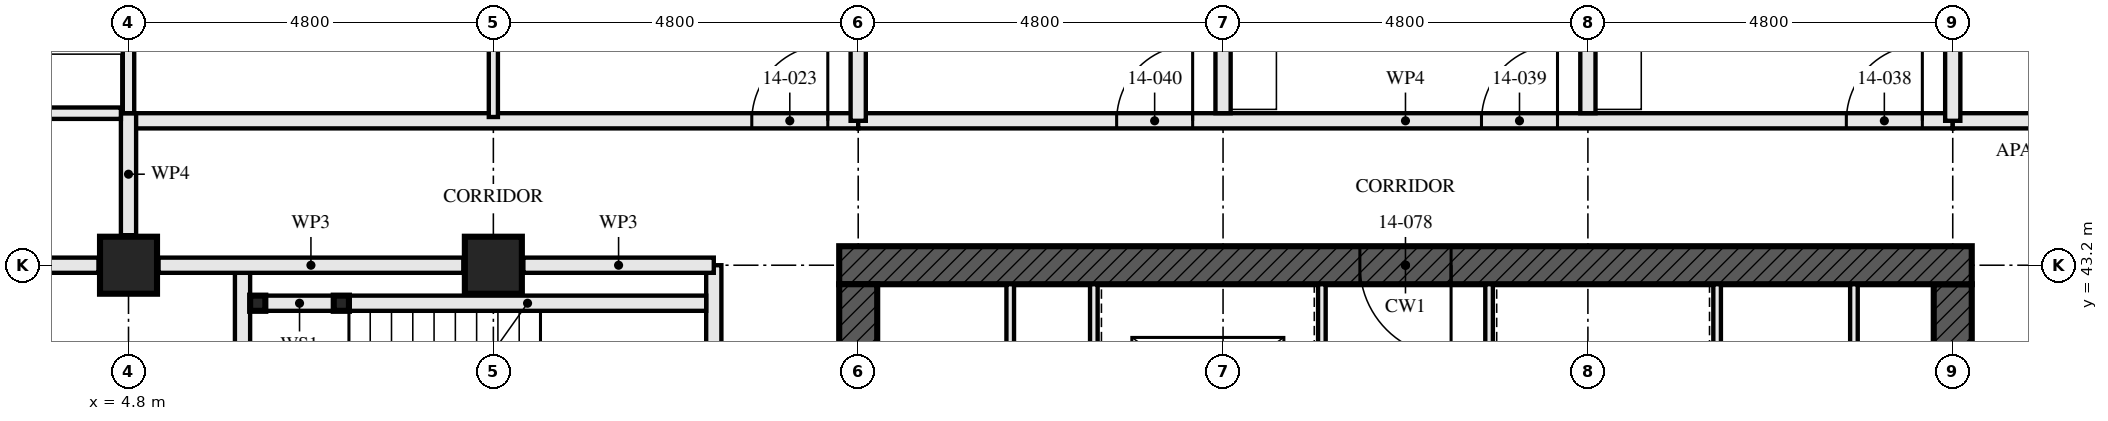
"""IFC4 building model, lengths in metres.
Left out: names, types, materials, properties, quantities, classifications, styles, units other than length and angle.
Written with IfcOpenShell. Run it as: python <this file> out.ifc"""

import sys

from ifc_helpers import new_model, si_unit, direction, frame, frame_2d, origin, origin_2d, place, context, subcontext, project, spatial, rectangle, hollow_rectangle, extrude, element, fill, save


model = new_model("IFC4")
c1 = context("Model", 3, precision=1e-05, world=origin(), true_north=direction((0.0, 1.0)))
c2 = subcontext(c1, "Body", "Model", "MODEL_VIEW")
j1 = project(units=[si_unit("LENGTHUNIT", "METRE"), si_unit("PLANEANGLEUNIT", "RADIAN")], contexts=[c1])
p1 = place(None, origin())
s1 = spatial("IfcSite", under=j1, at=p1, CompositionType="ELEMENT")
p2 = place(p1, origin())
s2 = spatial("IfcBuilding", under=s1, at=p2, CompositionType="ELEMENT")
p3 = place(p2, frame((0.0, 0.0, 55.0)))
s3 = spatial("IfcBuildingStorey", under=s2, at=p3, CompositionType="ELEMENT", Elevation=55.0)
for number, where, z_axis, x_axis in (
    (1, (4.8, 43.2, 0.0), (0.0, 0.0, 1.0), (0.0, 1.0, 0.0)),
    (2, (9.6, 43.2, 0.0), (0.0, 0.0, 1.0), (0.0, 1.0, 0.0)),
):
    element("IfcColumn", number, at=place(p3, frame(where, z_axis=z_axis, x_axis=x_axis)), inside=s3, PredefinedType="COLUMN", context=c2, shape_type="SweptSolid", body=[
        extrude(hollow_rectangle(XDim=0.75, YDim=0.75, WallThickness=0.08, at=origin_2d()), origin(), (0.0, 0.0, 1.0), 3.5),
    ])
p4 = place(p3, frame((29.05, 43.2, -0.17), z_axis=(0.0, 0.0, 1.0), x_axis=(-1.0, 0.0, 0.0)))
e3 = element("IfcWall", 3, at=p4, inside=s3, PredefinedType="SHEAR", context=c2, shape_type="SweptSolid", body=[
    extrude(rectangle(XDim=14.9, YDim=0.5, at=frame_2d((7.45, 0.0))), origin(), (0.0, 0.0, 1.0), 3.5),
])
p5 = place(p4, frame((6.85, 0.0, 0.17)))
e4 = element("IfcOpeningElement", 4, at=p5, cuts=e3, PredefinedType="OPENING", context=c2, shape_type="SweptSolid", body=[
    extrude(rectangle(XDim=1.2, YDim=2.1, at=frame_2d((0.6, 1.05))), frame((0.0, 0.26, 0.0), z_axis=(0.0, -1.0, 0.0), x_axis=(1.0, 0.0, 0.0)), (0.0, 0.0, 1.0), 0.521),
])
p6 = place(p3, frame((14.4, 42.95, -0.17), z_axis=(0.0, 0.0, 1.0), x_axis=(0.0, -1.0, 0.0)))
e5 = element("IfcWall", 5, at=p6, inside=s3, PredefinedType="SHEAR", context=c2, shape_type="SweptSolid", body=[
    extrude(rectangle(XDim=13.9, YDim=0.5, at=frame_2d((6.95, 0.0))), origin(), (0.0, 0.0, 1.0), 3.5),
])
p7 = place(p6, frame((6.35, 0.0, 0.17)))
e6 = element("IfcOpeningElement", 6, at=p7, cuts=e5, PredefinedType="OPENING", context=c2, shape_type="SweptSolid", body=[
    extrude(rectangle(XDim=1.2, YDim=2.1, at=frame_2d((0.6, 1.05))), frame((0.0, 0.26, 0.0), z_axis=(0.0, -1.0, 0.0), x_axis=(1.0, 0.0, 0.0)), (0.0, 0.0, 1.0), 0.521),
])
p8 = place(p3, frame((28.8, 29.05, -0.17), z_axis=(0.0, 0.0, 1.0), x_axis=(0.0, 1.0, 0.0)))
e7 = element("IfcWall", 7, at=p8, inside=s3, PredefinedType="SHEAR", context=c2, shape_type="SweptSolid", body=[
    extrude(rectangle(XDim=13.9, YDim=0.5, at=frame_2d((6.95, 0.0))), origin(), (0.0, 0.0, 1.0), 3.5),
])
p9 = place(p8, frame((6.35, 0.0, 0.17)))
e8 = element("IfcOpeningElement", 8, at=p9, cuts=e7, PredefinedType="OPENING", context=c2, shape_type="SweptSolid", body=[
    extrude(rectangle(XDim=1.2, YDim=2.1, at=frame_2d((0.6, 1.05))), frame((0.0, 0.26, 0.0), z_axis=(0.0, -1.0, 0.0), x_axis=(1.0, 0.0, 0.0)), (0.0, 0.0, 1.0), 0.521),
])
for number, where, z_axis, x_axis in (
    (9, (6.5, 42.7, 0.0), (0.0, 0.0, 1.0), (1.0, 0.0, 0.0)),
    (10, (7.6, 42.7, 0.0), (0.0, 0.0, 1.0), (1.0, 0.0, 0.0)),
):
    element("IfcColumn", number, at=place(p3, frame(where, z_axis=z_axis, x_axis=x_axis)), inside=s3, PredefinedType="COLUMN", context=c2, shape_type="SweptSolid", body=[
        extrude(hollow_rectangle(XDim=0.2, YDim=0.2, WallThickness=0.008, at=origin_2d()), origin(), (0.0, 0.0, 1.0), 3.33),
    ])
p10 = place(p3, frame((6.6, 42.7, 0.0), z_axis=(0.0, 0.0, 1.0), x_axis=(1.0, 0.0, 0.0)))
e11 = element("IfcWall", 11, at=p10, inside=s3, PredefinedType="SOLIDWALL", context=c2, shape_type="SweptSolid", body=[
    extrude(rectangle(XDim=0.9, YDim=0.2, at=frame_2d((0.45, 0.0))), origin(), (0.0, 0.0, 1.0), 2.99),
])
p11 = place(p3, frame((7.7, 42.7, 0.0), z_axis=(0.0, 0.0, 1.0), x_axis=(1.0, 0.0, 0.0)))
e12 = element("IfcWall", 12, at=p11, inside=s3, PredefinedType="SOLIDWALL", context=c2, shape_type="SweptSolid", body=[
    extrude(rectangle(XDim=4.7, YDim=0.2, at=frame_2d((2.35, 0.0))), origin(), (0.0, 0.0, 1.0), 2.99),
])
p12 = place(p3, frame((6.3, 43.1, 0.0), z_axis=(0.0, 0.0, 1.0), x_axis=(0.0, -1.0, 0.0)))
e13 = element("IfcWall", 13, at=p12, inside=s3, PredefinedType="SOLIDWALL", context=c2, shape_type="SweptSolid", body=[
    extrude(rectangle(XDim=3.3, YDim=0.2, at=frame_2d((1.65, 0.0))), origin(), (0.0, 0.0, 1.0), 3.33),
])
p13 = place(p3, frame((12.5, 43.2, 0.0), z_axis=(0.0, 0.0, 1.0), x_axis=(0.0, -1.0, 0.0)))
e14 = element("IfcWall", 14, at=p13, inside=s3, PredefinedType="PARTITIONING", context=c2, shape_type="SweptSolid", body=[
    extrude(rectangle(XDim=14.4, YDim=0.2, at=frame_2d((7.2, 0.0))), origin(), (0.0, 0.0, 1.0), 2.55),
])
p14 = place(p13, frame((1.4, 0.0, 0.0)))
e15 = element("IfcOpeningElement", 15, at=p14, cuts=e14, PredefinedType="OPENING", context=c2, shape_type="SweptSolid", body=[
    extrude(rectangle(XDim=1.0, YDim=2.1, at=frame_2d((0.5, 1.05))), frame((0.0, 0.111, 0.0), z_axis=(0.0, -1.0, 0.0), x_axis=(1.0, 0.0, 0.0)), (0.0, 0.0, 1.0), 0.221),
])
p15 = place(p13, frame((5.2, 0.0, 0.0)))
e16 = element("IfcOpeningElement", 16, at=p15, cuts=e14, PredefinedType="OPENING", context=c2, shape_type="SweptSolid", body=[
    extrude(rectangle(XDim=1.0, YDim=2.1, at=frame_2d((0.5, 1.05))), frame((0.0, 0.111, 0.0), z_axis=(0.0, -1.0, 0.0), x_axis=(1.0, 0.0, 0.0)), (0.0, 0.0, 1.0), 0.221),
])
p16 = place(p13, frame((10.0, 0.0, 0.0)))
e17 = element("IfcOpeningElement", 17, at=p16, cuts=e14, PredefinedType="OPENING", context=c2, shape_type="SweptSolid", body=[
    extrude(rectangle(XDim=1.0, YDim=2.1, at=frame_2d((0.5, 1.05))), frame((0.0, 0.111, 0.0), z_axis=(0.0, -1.0, 0.0), x_axis=(1.0, 0.0, 0.0)), (0.0, 0.0, 1.0), 0.221),
])
p17 = place(p3, frame((4.8, 48.2, 0.0), z_axis=(0.0, 0.0, 1.0), x_axis=(0.0, -1.0, 0.0)))
e18 = element("IfcWall", 18, at=p17, inside=s3, PredefinedType="PARTITIONING", context=c2, shape_type="SweptSolid", body=[
    extrude(rectangle(XDim=3.0, YDim=0.15, at=frame_2d((1.5, 0.0))), origin(), (0.0, 0.0, 1.0), 2.55),
])
p18 = place(p17, frame((1.05, 0.0, 0.0)))
e19 = element("IfcOpeningElement", 19, at=p18, cuts=e18, PredefinedType="OPENING", context=c2, shape_type="SweptSolid", body=[
    extrude(rectangle(XDim=0.9, YDim=2.1, at=frame_2d((0.45, 1.05))), frame((0.0, 0.085, 0.0), z_axis=(0.0, -1.0, 0.0), x_axis=(1.0, 0.0, 0.0)), (0.0, 0.0, 1.0), 0.171),
])
p19 = place(p3, frame((9.6, 53.4, 0.0), z_axis=(0.0, 0.0, 1.0), x_axis=(0.0, -1.0, 0.0)))
e20 = element("IfcWall", 20, at=p19, inside=s3, PredefinedType="PARTITIONING", context=c2, shape_type="SweptSolid", body=[
    extrude(rectangle(XDim=8.25, YDim=0.12, at=frame_2d((4.125, 0.0))), origin(), (0.0, 0.0, 1.0), 2.55),
])
p20 = place(p19, frame((5.15, 0.0, 0.0)))
e21 = element("IfcOpeningElement", 21, at=p20, cuts=e20, PredefinedType="OPENING", context=c2, shape_type="SweptSolid", body=[
    extrude(rectangle(XDim=0.9, YDim=2.1, at=frame_2d((0.45, 1.05))), frame((0.0, 0.071, 0.0), z_axis=(0.0, -1.0, 0.0), x_axis=(1.0, 0.0, 0.0)), (0.0, 0.0, 1.0), 0.141),
])
p21 = place(p3, frame((14.4, 45.1, 0.0), z_axis=(0.0, 0.0, 1.0), x_axis=(-1.0, 0.0, 0.0)))
e22 = element("IfcWall", 22, at=p21, inside=s3, PredefinedType="PARTITIONING", context=c2, shape_type="SweptSolid", body=[
    extrude(rectangle(XDim=9.6, YDim=0.2, at=frame_2d((4.8, 0.0))), origin(), (0.0, 0.0, 1.0), 3.33),
])
p22 = place(p21, frame((0.4, 0.0, 0.0)))
e23 = element("IfcOpeningElement", 23, at=p22, cuts=e22, PredefinedType="OPENING", context=c2, shape_type="SweptSolid", body=[
    extrude(rectangle(XDim=1.0, YDim=2.1, at=frame_2d((0.5, 1.05))), frame((0.0, 0.111, 0.0), z_axis=(0.0, -1.0, 0.0), x_axis=(1.0, 0.0, 0.0)), (0.0, 0.0, 1.0), 0.221),
])
p23 = place(p3, frame((4.8, 45.2, 0.0), z_axis=(0.0, 0.0, 1.0), x_axis=(0.0, -1.0, 0.0)))
e24 = element("IfcWall", 24, at=p23, inside=s3, PredefinedType="PARTITIONING", context=c2, shape_type="SweptSolid", body=[
    extrude(rectangle(XDim=1.605, YDim=0.2, at=frame_2d((0.802, 0.0))), origin(), (0.0, 0.0, 1.0), 3.33),
])
for number, where, z_axis, x_axis in (
    (25, (24.0, 57.28, 0.0), (0.0, 0.0, 1.0), (0.0, -1.0, 0.0)),
    (26, (19.2, 57.28, 0.0), (0.0, 0.0, 1.0), (0.0, -1.0, 0.0)),
):
    element("IfcWall", number, at=place(p3, frame(where, z_axis=z_axis, x_axis=x_axis)), inside=s3, PredefinedType="PARTITIONING", context=c2, shape_type="SweptSolid", body=[
        extrude(rectangle(XDim=12.08, YDim=0.2, at=frame_2d((6.04, 0.0))), origin(), (0.0, 0.0, 1.0), 2.55),
    ])
p24 = place(p3, frame((28.8, 45.1, 0.0), z_axis=(0.0, 0.0, 1.0), x_axis=(-1.0, 0.0, 0.0)))
e27 = element("IfcWall", 27, at=p24, inside=s3, PredefinedType="PARTITIONING", context=c2, shape_type="SweptSolid", body=[
    extrude(rectangle(XDim=14.4, YDim=0.2, at=frame_2d((7.2, 0.0))), origin(), (0.0, 0.0, 1.0), 3.33),
])
p25 = place(p24, frame((0.4, 0.0, 0.0)))
e28 = element("IfcOpeningElement", 28, at=p25, cuts=e27, PredefinedType="OPENING", context=c2, shape_type="SweptSolid", body=[
    extrude(rectangle(XDim=1.0, YDim=2.1, at=frame_2d((0.5, 1.05))), frame((0.0, 0.111, 0.0), z_axis=(0.0, -1.0, 0.0), x_axis=(1.0, 0.0, 0.0)), (0.0, 0.0, 1.0), 0.221),
])
p26 = place(p24, frame((5.2, 0.0, 0.0)))
e29 = element("IfcOpeningElement", 29, at=p26, cuts=e27, PredefinedType="OPENING", context=c2, shape_type="SweptSolid", body=[
    extrude(rectangle(XDim=1.0, YDim=2.1, at=frame_2d((0.5, 1.05))), frame((0.0, 0.111, 0.0), z_axis=(0.0, -1.0, 0.0), x_axis=(1.0, 0.0, 0.0)), (0.0, 0.0, 1.0), 0.221),
])
p27 = place(p24, frame((10.0, 0.0, 0.0)))
e30 = element("IfcOpeningElement", 30, at=p27, cuts=e27, PredefinedType="OPENING", context=c2, shape_type="SweptSolid", body=[
    extrude(rectangle(XDim=1.0, YDim=2.1, at=frame_2d((0.5, 1.05))), frame((0.0, 0.111, 0.0), z_axis=(0.0, -1.0, 0.0), x_axis=(1.0, 0.0, 0.0)), (0.0, 0.0, 1.0), 0.221),
])
p28 = place(p3, frame((38.4, 45.1, 0.0), z_axis=(0.0, 0.0, 1.0), x_axis=(-1.0, 0.0, 0.0)))
e31 = element("IfcWall", 31, at=p28, inside=s3, PredefinedType="PARTITIONING", context=c2, shape_type="SweptSolid", body=[
    extrude(rectangle(XDim=9.6, YDim=0.2, at=frame_2d((4.8, 0.0))), origin(), (0.0, 0.0, 1.0), 3.33),
])
p29 = place(p28, frame((0.4, 0.0, 0.0)))
e32 = element("IfcOpeningElement", 32, at=p29, cuts=e31, PredefinedType="OPENING", context=c2, shape_type="SweptSolid", body=[
    extrude(rectangle(XDim=1.0, YDim=2.1, at=frame_2d((0.5, 1.05))), frame((0.0, 0.111, 0.0), z_axis=(0.0, -1.0, 0.0), x_axis=(1.0, 0.0, 0.0)), (0.0, 0.0, 1.0), 0.221),
])
for number, where, z_axis, x_axis in (
    (33, (16.4, 37.15, 0.0), (0.0, 0.0, 1.0), (0.0, 1.0, 0.0)),
    (34, (27.5, 37.15, 0.0), (0.0, 0.0, 1.0), (0.0, 1.0, 0.0)),
):
    element("IfcWall", number, at=place(p3, frame(where, z_axis=z_axis, x_axis=x_axis)), inside=s3, PredefinedType="SOLIDWALL", context=c2, shape_type="SweptSolid", body=[
        extrude(rectangle(XDim=5.8, YDim=0.1, at=frame_2d((2.9, 0.0))), origin(), (0.0, 0.0, 1.0), 3.33),
    ])
p30 = place(p3, frame((20.5, 37.15, 0.0), z_axis=(0.0, 0.0, 1.0), x_axis=(0.0, 1.0, 0.0)))
e35 = element("IfcWall", 35, at=p30, inside=s3, PredefinedType="SOLIDWALL", context=c2, shape_type="SweptSolid", body=[
    extrude(rectangle(XDim=5.8, YDim=0.1, at=frame_2d((2.9, 0.0))), origin(), (0.0, 0.0, 1.0), 3.33),
])
p31 = place(p30, frame((0.925, 0.0, 0.0)))
e36 = element("IfcOpeningElement", 36, at=p31, cuts=e35, PredefinedType="OPENING", context=c2, shape_type="SweptSolid", body=[
    extrude(rectangle(XDim=1.0, YDim=2.1, at=frame_2d((0.5, 1.05))), frame((0.0, 0.061, 0.0), z_axis=(0.0, -1.0, 0.0), x_axis=(1.0, 0.0, 0.0)), (0.0, 0.0, 1.0), 0.121),
])
p32 = place(p30, frame((3.9, 0.0, 0.0)))
e37 = element("IfcOpeningElement", 37, at=p32, cuts=e35, PredefinedType="OPENING", context=c2, shape_type="SweptSolid", body=[
    extrude(rectangle(XDim=1.0, YDim=2.1, at=frame_2d((0.5, 1.05))), frame((0.0, 0.061, 0.0), z_axis=(0.0, -1.0, 0.0), x_axis=(1.0, 0.0, 0.0)), (0.0, 0.0, 1.0), 0.121),
])
for number, where, z_axis, x_axis in (
    (38, (22.7, 37.15, 0.0), (0.0, 0.0, 1.0), (0.0, 1.0, 0.0)),
    (39, (17.5, 37.15, 0.0), (0.0, 0.0, 1.0), (0.0, 1.0, 0.0)),
    (40, (25.7, 37.15, 0.0), (0.0, 0.0, 1.0), (0.0, 1.0, 0.0)),
):
    element("IfcWall", number, at=place(p3, frame(where, z_axis=z_axis, x_axis=x_axis)), inside=s3, PredefinedType="SOLIDWALL", context=c2, shape_type="SweptSolid", body=[
        extrude(rectangle(XDim=5.8, YDim=0.1, at=frame_2d((2.9, 0.0))), origin(), (0.0, 0.0, 1.0), 3.33),
    ])
p33 = place(p3, frame((12.5, 43.2, 0.0), z_axis=(0.0, 0.0, 1.0), x_axis=(-1.0, 0.0, 0.0)))
e41 = element("IfcWall", 41, at=p33, inside=s3, PredefinedType="PARTITIONING", context=c2, shape_type="SweptSolid", body=[
    extrude(rectangle(XDim=2.505, YDim=0.2, at=frame_2d((1.252, 0.0))), origin(), (0.0, 0.0, 1.0), 2.32),
])
p34 = place(p3, frame((9.205, 43.2, 0.0), z_axis=(0.0, 0.0, 1.0), x_axis=(-1.0, 0.0, 0.0)))
e42 = element("IfcWall", 42, at=p34, inside=s3, PredefinedType="PARTITIONING", context=c2, shape_type="SweptSolid", body=[
    extrude(rectangle(XDim=4.01, YDim=0.2, at=frame_2d((2.005, 0.0))), origin(), (0.0, 0.0, 1.0), 2.32),
])
p35 = place(p3, frame((4.405, 43.2, 0.0), z_axis=(0.0, 0.0, 1.0), x_axis=(-1.0, 0.0, 0.0)))
e43 = element("IfcWall", 43, at=p35, inside=s3, PredefinedType="PARTITIONING", context=c2, shape_type="SweptSolid", body=[
    extrude(rectangle(XDim=4.085, YDim=0.2, at=frame_2d((2.042, 0.0))), origin(), (0.0, 0.0, 1.0), 2.32),
])
for number, where, z_axis, x_axis in (
    (44, (14.4, 45.1, 0.0), (0.0, 0.0, 1.0), (0.0, 1.0, 0.0)),
    (45, (28.8, 45.1, 0.0), (0.0, 0.0, 1.0), (0.0, 1.0, 0.0)),
):
    element("IfcWall", number, at=place(p3, frame(where, z_axis=z_axis, x_axis=x_axis)), inside=s3, PredefinedType="PARTITIONING", context=c2, shape_type="SweptSolid", body=[
        extrude(rectangle(XDim=2.555, YDim=0.2, at=frame_2d((1.277, 0.0))), origin(), (0.0, 0.0, 1.0), 2.32),
    ])
p36 = place(p3, frame((4.7, 45.2, 0.0), z_axis=(0.0, 0.0, 1.0), x_axis=(-1.0, 0.0, 0.0)))
e46 = element("IfcWall", 46, at=p36, inside=s3, PredefinedType="PARTITIONING", context=c2, shape_type="SweptSolid", body=[
    extrude(rectangle(XDim=5.135, YDim=0.15, at=frame_2d((2.567, 0.0))), origin(), (0.0, 0.0, 1.0), 2.32),
])
p37 = place(p22, frame((1.0, 0.0, 0.0), z_axis=(0.0, 0.0, 1.0), x_axis=(-1.0, 0.0, 0.0)))
e47 = element("IfcDoor", 47, at=p37, inside=s3, OperationType="SINGLE_SWING_LEFT", PredefinedType="DOOR", context=c2, shape_type="SweptSolid", body=[
    extrude(rectangle(XDim=1.0, YDim=2.1, at=frame_2d((0.5, 1.05))), frame((0.0, 0.027, 0.0), z_axis=(0.0, -1.0, 0.0), x_axis=(1.0, 0.0, 0.0)), (0.0, 0.0, 1.0), 0.054),
])
fill(e23, e47)
p38 = place(p25, frame((1.0, 0.0, 0.0), z_axis=(0.0, 0.0, 1.0), x_axis=(-1.0, 0.0, 0.0)))
e48 = element("IfcDoor", 48, at=p38, inside=s3, OperationType="SINGLE_SWING_LEFT", PredefinedType="DOOR", context=c2, shape_type="SweptSolid", body=[
    extrude(rectangle(XDim=1.0, YDim=2.1, at=frame_2d((0.5, 1.05))), frame((0.0, 0.027, 0.0), z_axis=(0.0, -1.0, 0.0), x_axis=(1.0, 0.0, 0.0)), (0.0, 0.0, 1.0), 0.054),
])
fill(e28, e48)
p39 = place(p26, frame((1.0, 0.0, 0.0), z_axis=(0.0, 0.0, 1.0), x_axis=(-1.0, 0.0, 0.0)))
e49 = element("IfcDoor", 49, at=p39, inside=s3, OperationType="SINGLE_SWING_LEFT", PredefinedType="DOOR", context=c2, shape_type="SweptSolid", body=[
    extrude(rectangle(XDim=1.0, YDim=2.1, at=frame_2d((0.5, 1.05))), frame((0.0, 0.027, 0.0), z_axis=(0.0, -1.0, 0.0), x_axis=(1.0, 0.0, 0.0)), (0.0, 0.0, 1.0), 0.054),
])
fill(e29, e49)
p40 = place(p27, frame((1.0, 0.0, 0.0), z_axis=(0.0, 0.0, 1.0), x_axis=(-1.0, 0.0, 0.0)))
e50 = element("IfcDoor", 50, at=p40, inside=s3, OperationType="SINGLE_SWING_LEFT", PredefinedType="DOOR", context=c2, shape_type="SweptSolid", body=[
    extrude(rectangle(XDim=1.0, YDim=2.1, at=frame_2d((0.5, 1.05))), frame((0.0, 0.027, 0.0), z_axis=(0.0, -1.0, 0.0), x_axis=(1.0, 0.0, 0.0)), (0.0, 0.0, 1.0), 0.054),
])
fill(e30, e50)
p41 = place(p5, origin())
e51 = element("IfcDoor", 51, at=p41, inside=s3, OperationType="SINGLE_SWING_LEFT", PredefinedType="DOOR", context=c2, shape_type="SweptSolid", body=[
    extrude(rectangle(XDim=1.2, YDim=2.1, at=frame_2d((0.6, 1.05))), frame((0.0, 0.027, 0.0), z_axis=(0.0, -1.0, 0.0), x_axis=(1.0, 0.0, 0.0)), (0.0, 0.0, 1.0), 0.054),
])
fill(e4, e51)
save(model, sys.argv[1])
